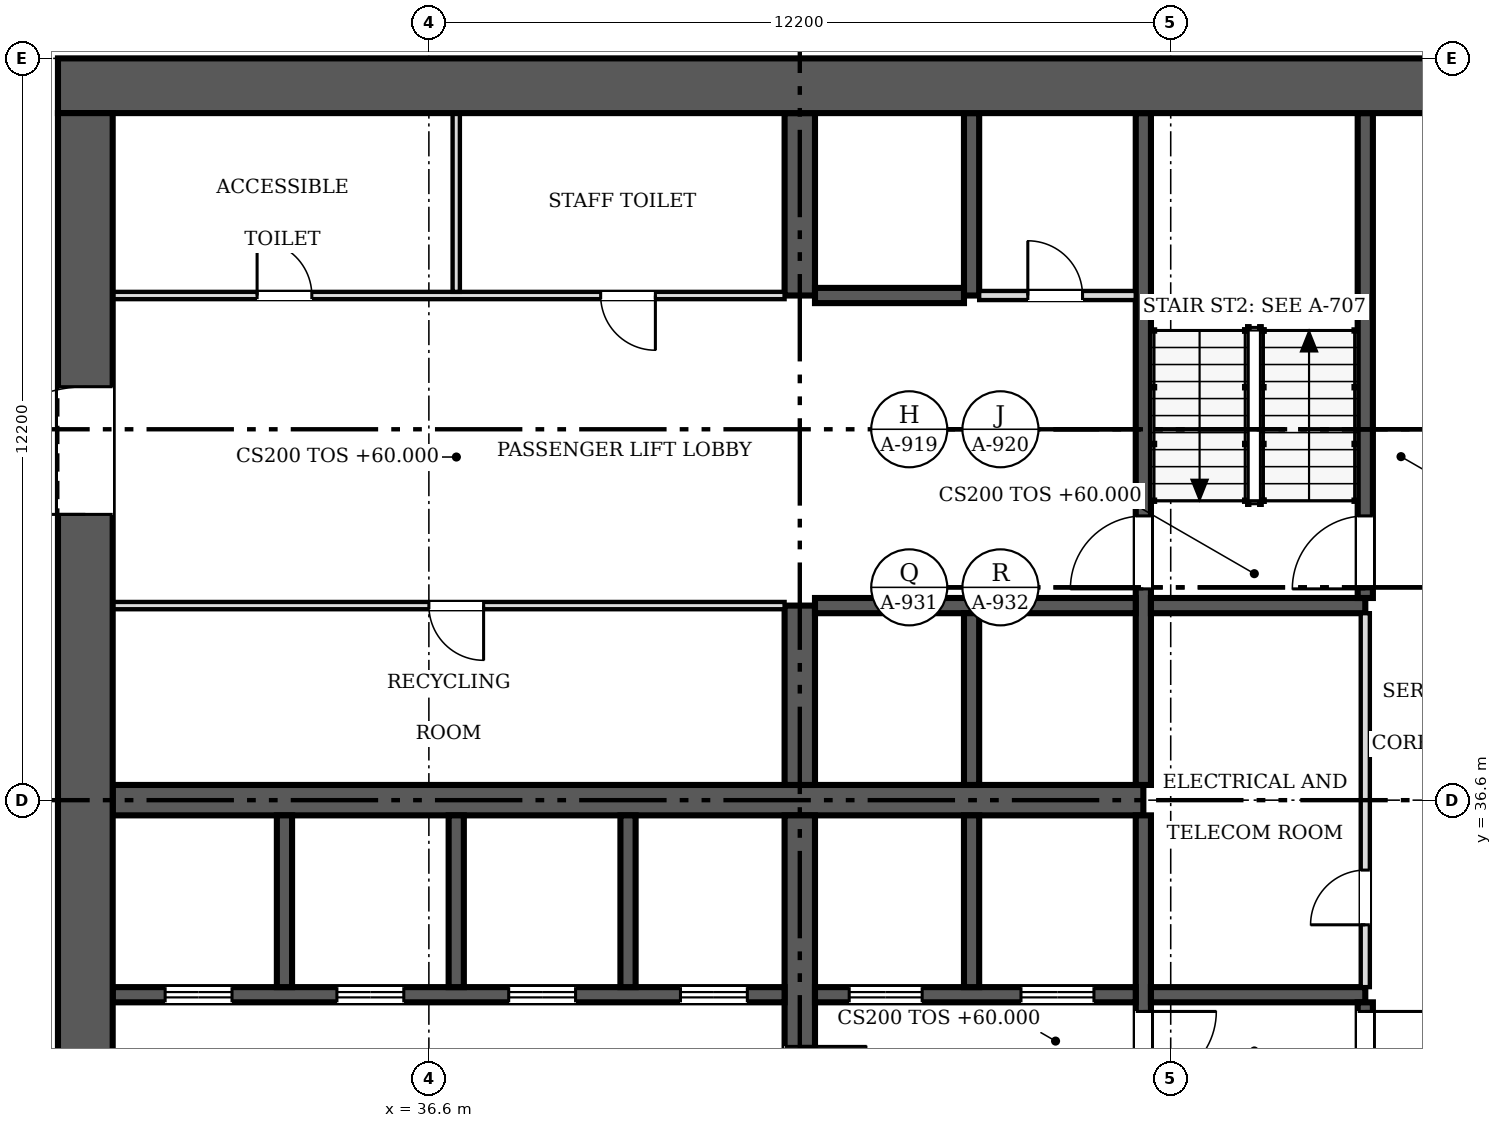
"""IFC4 building model, lengths in metres.
Left out: names, types, materials, properties, quantities, classifications, styles, units other than length and angle.
Written with IfcOpenShell. Run it as: python <this file> out.ifc"""

import sys

from ifc_helpers import new_model, si_unit, direction, frame, frame_2d, origin, place, context, subcontext, project, spatial, rectangle, extrude, source, transform, mapped, element, fill, save


model = new_model("IFC4")
c1 = context("Model", 3, precision=1e-05, world=origin(), true_north=direction((0.0, 1.0)))
c2 = subcontext(c1, "Body", "Model", "MODEL_VIEW")
j1 = project(units=[si_unit("LENGTHUNIT", "METRE"), si_unit("PLANEANGLEUNIT", "RADIAN")], contexts=[c1])
p1 = place(None, origin())
s1 = spatial("IfcSite", under=j1, at=p1, CompositionType="ELEMENT")
p2 = place(p1, origin())
s2 = spatial("IfcBuilding", under=s1, at=p2, CompositionType="ELEMENT")
p3 = place(p2, frame((0.0, 0.0, 60.0)))
s3 = spatial("IfcBuildingStorey", under=s2, at=p3, CompositionType="ELEMENT", Elevation=60.0)
p4 = place(p3, frame((30.95, 25.3, 0.0), z_axis=(0.0, 0.0, 1.0), x_axis=(0.0, 1.0, 0.0)))
e1 = element("IfcWall", 1, at=p4, inside=s3, PredefinedType="SHEAR", context=c2, shape_type="SweptSolid", body=[
    extrude(rectangle(XDim=22.6, YDim=0.9, at=frame_2d((11.3, 0.0))), origin(), (0.0, 0.0, 1.0), 3.8),
])
m1 = source(origin(), c2, "Body", "SweptSolid", [
    extrude(rectangle(XDim=2.1, YDim=2.4, at=frame_2d((1.05, 1.2))), frame((0.0, 0.46, 0.0), z_axis=(0.0, -1.0, 0.0), x_axis=(1.0, 0.0, 0.0)), (0.0, 0.0, 1.0), 0.92),
])
p5 = place(p4, frame((4.5, 0.0, 0.0)))
e2 = element("IfcOpeningElement", 2, at=p5, cuts=e1, PredefinedType="OPENING", context=c2, shape_type="MappedRepresentation", body=[
    mapped(m1, transform((0.0, 0.0, 0.0), scale=1.0)),
])
p6 = place(p4, frame((16.0, 0.0, 0.0)))
e3 = element("IfcOpeningElement", 3, at=p6, cuts=e1, PredefinedType="OPENING", context=c2, shape_type="MappedRepresentation", body=[
    mapped(m1, transform((0.0, 0.0, 0.0), scale=1.0)),
])
p7 = place(p3, frame((30.5, 48.35, 0.0), z_axis=(0.0, 0.0, 1.0), x_axis=(1.0, 0.0, 0.0)))
e4 = element("IfcWall", 4, at=p7, inside=s3, PredefinedType="SHEAR", context=c2, shape_type="SweptSolid", body=[
    extrude(rectangle(XDim=24.4, YDim=0.9, at=frame_2d((12.2, 0.0))), origin(), (0.0, 0.0, 1.0), 3.8),
])
p8 = place(p3, frame((31.4, 36.6, 0.0), z_axis=(0.0, 0.0, 1.0), x_axis=(1.0, 0.0, 0.0)))
e5 = element("IfcWall", 5, at=p8, inside=s3, PredefinedType="SHEAR", context=c2, shape_type="SweptSolid", body=[
    extrude(rectangle(XDim=16.95, YDim=0.5, at=frame_2d((8.475, 0.0))), origin(), (0.0, 0.0, 1.0), 3.8),
])
p9 = place(p3, frame((42.7, 36.35, 0.0), z_axis=(0.0, 0.0, 1.0), x_axis=(0.0, -1.0, 0.0)))
e6 = element("IfcWall", 6, at=p9, inside=s3, PredefinedType="SHEAR", context=c2, shape_type="SweptSolid", body=[
    extrude(rectangle(XDim=11.05, YDim=0.5, at=frame_2d((5.525, 0.0))), origin(), (0.0, 0.0, 1.0), 3.8),
])
m2 = source(origin(), c2, "Body", "SweptSolid", [
    extrude(rectangle(XDim=0.9, YDim=2.1, at=frame_2d((0.45, 1.05))), frame((0.0, 0.26, 0.0), z_axis=(0.0, -1.0, 0.0), x_axis=(1.0, 0.0, 0.0)), (0.0, 0.0, 1.0), 0.52),
])
p10 = place(p9, frame((6.5, 0.0, 0.0)))
e7 = element("IfcOpeningElement", 7, at=p10, cuts=e6, PredefinedType="OPENING", context=c2, shape_type="MappedRepresentation", body=[
    mapped(m2, transform((0.0, 0.0, 0.0), scale=1.0)),
])
m3 = source(origin(), c2, "Body", "SweptSolid", [
    extrude(rectangle(XDim=1.1, YDim=2.1, at=frame_2d((0.55, 1.05))), frame((0.0, 0.26, 0.0), z_axis=(0.0, -1.0, 0.0), x_axis=(1.0, 0.0, 0.0)), (0.0, 0.0, 1.0), 0.52),
])
p11 = place(p9, frame((3.8, 0.0, 0.0)))
e8 = element("IfcOpeningElement", 8, at=p11, cuts=e6, PredefinedType="OPENING", context=c2, shape_type="MappedRepresentation", body=[
    mapped(m3, transform((0.0, 0.0, 0.0), scale=1.0)),
])
p12 = place(p3, frame((42.7, 36.85, 0.0), z_axis=(0.0, 0.0, 1.0), x_axis=(0.0, 1.0, 0.0)))
e9 = element("IfcWall", 9, at=p12, inside=s3, PredefinedType="SHEAR", context=c2, shape_type="SweptSolid", body=[
    extrude(rectangle(XDim=2.95, YDim=0.5, at=frame_2d((1.475, 0.0))), origin(), (0.0, 0.0, 1.0), 3.8),
])
p13 = place(p3, frame((42.7, 44.9, 0.0), z_axis=(0.0, 0.0, 1.0), x_axis=(0.0, 1.0, 0.0)))
e10 = element("IfcWall", 10, at=p13, inside=s3, PredefinedType="SHEAR", context=c2, shape_type="SweptSolid", body=[
    extrude(rectangle(XDim=3.0, YDim=0.5, at=frame_2d((1.5, 0.0))), origin(), (0.0, 0.0, 1.0), 3.8),
])
p14 = place(p3, frame((48.35, 36.35, 0.0), z_axis=(0.0, 0.0, 1.0), x_axis=(0.0, -1.0, 0.0)))
e11 = element("IfcWall", 11, at=p14, inside=s3, PredefinedType="SOLIDWALL", context=c2, shape_type="SweptSolid", body=[
    extrude(rectangle(XDim=11.05, YDim=0.25, at=frame_2d((5.525, 0.0))), origin(), (0.0, 0.0, 1.0), 3.8),
])
m4 = source(origin(), c2, "Body", "SweptSolid", [
    extrude(rectangle(XDim=1.2, YDim=2.1, at=frame_2d((0.6, 1.05))), frame((0.0, 0.135, 0.0), z_axis=(0.0, -1.0, 0.0), x_axis=(1.0, 0.0, 0.0)), (0.0, 0.0, 1.0), 0.27),
])
p15 = place(p14, frame((3.225, 0.0, 0.0)))
e12 = element("IfcOpeningElement", 12, at=p15, cuts=e11, PredefinedType="OPENING", context=c2, shape_type="MappedRepresentation", body=[
    mapped(m4, transform((0.0, 0.0, 0.0), scale=1.0)),
])
p16 = place(p3, frame((48.35, 47.9, 0.0), z_axis=(0.0, 0.0, 1.0), x_axis=(0.0, -1.0, 0.0)))
e13 = element("IfcWall", 13, at=p16, inside=s3, PredefinedType="SOLIDWALL", context=c2, shape_type="SweptSolid", body=[
    extrude(rectangle(XDim=11.05, YDim=0.25, at=frame_2d((5.525, 0.0))), origin(), (0.0, 0.0, 1.0), 3.8),
])
p17 = place(p16, frame((6.625, 0.0, 0.0)))
e14 = element("IfcOpeningElement", 14, at=p17, cuts=e13, PredefinedType="OPENING", context=c2, shape_type="MappedRepresentation", body=[
    mapped(m4, transform((0.0, 0.0, 0.0), scale=1.0)),
])
p18 = place(p3, frame((42.45, 33.4, 0.0), z_axis=(0.0, 0.0, 1.0), x_axis=(-1.0, 0.0, 0.0)))
e15 = element("IfcWall", 15, at=p18, inside=s3, PredefinedType="SOLIDWALL", context=c2, shape_type="SweptSolid", body=[
    extrude(rectangle(XDim=11.05, YDim=0.25, at=frame_2d((5.525, 0.0))), origin(), (0.0, 0.0, 1.0), 3.8),
])
m5 = source(origin(), c2, "Body", "SweptSolid", [
    extrude(rectangle(XDim=1.1, YDim=2.1, at=frame_2d((0.55, 1.05))), frame((0.0, 0.135, 0.0), z_axis=(0.0, -1.0, 0.0), x_axis=(1.0, 0.0, 0.0)), (0.0, 0.0, 1.0), 0.27),
])
p19 = place(p18, frame((9.087, 0.0, 0.0)))
e16 = element("IfcOpeningElement", 16, at=p19, cuts=e15, PredefinedType="OPENING", context=c2, shape_type="MappedRepresentation", body=[
    mapped(m5, transform((0.0, 0.0, 0.0), scale=1.0)),
])
p20 = place(p18, frame((6.262, 0.0, 0.0)))
e17 = element("IfcOpeningElement", 17, at=p20, cuts=e15, PredefinedType="OPENING", context=c2, shape_type="MappedRepresentation", body=[
    mapped(m5, transform((0.0, 0.0, 0.0), scale=1.0)),
])
p21 = place(p18, frame((3.438, 0.0, 0.0)))
e18 = element("IfcOpeningElement", 18, at=p21, cuts=e15, PredefinedType="OPENING", context=c2, shape_type="MappedRepresentation", body=[
    mapped(m5, transform((0.0, 0.0, 0.0), scale=1.0)),
])
p22 = place(p18, frame((0.613, 0.0, 0.0)))
e19 = element("IfcOpeningElement", 19, at=p22, cuts=e15, PredefinedType="OPENING", context=c2, shape_type="MappedRepresentation", body=[
    mapped(m5, transform((0.0, 0.0, 0.0), scale=1.0)),
])
p23 = place(p3, frame((48.225, 33.4, 0.0), z_axis=(0.0, 0.0, 1.0), x_axis=(-1.0, 0.0, 0.0)))
e20 = element("IfcWall", 20, at=p23, inside=s3, PredefinedType="SOLIDWALL", context=c2, shape_type="SweptSolid", body=[
    extrude(rectangle(XDim=5.275, YDim=0.25, at=frame_2d((2.638, 0.0))), origin(), (0.0, 0.0, 1.0), 3.8),
])
p24 = place(p23, frame((3.512, 0.0, 0.0)))
e21 = element("IfcOpeningElement", 21, at=p24, cuts=e20, PredefinedType="OPENING", context=c2, shape_type="MappedRepresentation", body=[
    mapped(m4, transform((0.0, 0.0, 0.0), scale=1.0)),
])
p25 = place(p23, frame((0.688, 0.0, 0.0)))
e22 = element("IfcOpeningElement", 22, at=p25, cuts=e20, PredefinedType="OPENING", context=c2, shape_type="MappedRepresentation", body=[
    mapped(m4, transform((0.0, 0.0, 0.0), scale=1.0)),
])
p26 = place(p3, frame((48.475, 33.4, 0.0), z_axis=(0.0, 0.0, 1.0), x_axis=(1.0, 0.0, 0.0)))
e23 = element("IfcWall", 23, at=p26, inside=s3, PredefinedType="SOLIDWALL", context=c2, shape_type="SweptSolid", body=[
    extrude(rectangle(XDim=3.525, YDim=0.25, at=frame_2d((1.762, 0.0))), origin(), (0.0, 0.0, 1.0), 3.8),
])
p27 = place(p3, frame((42.95, 39.8, 0.0), z_axis=(0.0, 0.0, 1.0), x_axis=(1.0, 0.0, 0.0)))
e24 = element("IfcWall", 24, at=p27, inside=s3, PredefinedType="SOLIDWALL", context=c2, shape_type="SweptSolid", body=[
    extrude(rectangle(XDim=5.275, YDim=0.25, at=frame_2d((2.638, 0.0))), origin(), (0.0, 0.0, 1.0), 3.8),
])
p28 = place(p3, frame((48.475, 39.8, 0.0), z_axis=(0.0, 0.0, 1.0), x_axis=(1.0, 0.0, 0.0)))
e25 = element("IfcWall", 25, at=p28, inside=s3, PredefinedType="SOLIDWALL", context=c2, shape_type="SweptSolid", body=[
    extrude(rectangle(XDim=3.525, YDim=0.25, at=frame_2d((1.762, 0.0))), origin(), (0.0, 0.0, 1.0), 3.8),
])
p29 = place(p3, frame((52.0, 25.3, 0.0), z_axis=(0.0, 0.0, 1.0), x_axis=(0.0, 1.0, 0.0)))
e26 = element("IfcWall", 26, at=p29, inside=s3, PredefinedType="SOLIDWALL", context=c2, shape_type="SweptSolid", body=[
    extrude(rectangle(XDim=7.975, YDim=0.25, at=frame_2d((3.987, 0.0))), origin(), (0.0, 0.0, 1.0), 3.8),
])
p30 = place(p29, frame((6.625, 0.0, 0.0)))
e27 = element("IfcOpeningElement", 27, at=p30, cuts=e26, PredefinedType="OPENING", context=c2, shape_type="MappedRepresentation", body=[
    mapped(m4, transform((0.0, 0.0, 0.0), scale=1.0)),
])
p31 = place(p3, frame((52.0, 39.925, 0.0), z_axis=(0.0, 0.0, 1.0), x_axis=(0.0, 1.0, 0.0)))
e28 = element("IfcWall", 28, at=p31, inside=s3, PredefinedType="SOLIDWALL", context=c2, shape_type="SweptSolid", body=[
    extrude(rectangle(XDim=7.975, YDim=0.25, at=frame_2d((3.987, 0.0))), origin(), (0.0, 0.0, 1.0), 3.8),
])
p32 = place(p31, frame((0.15, 0.0, 0.0)))
e29 = element("IfcOpeningElement", 29, at=p32, cuts=e28, PredefinedType="OPENING", context=c2, shape_type="MappedRepresentation", body=[
    mapped(m4, transform((0.0, 0.0, 0.0), scale=1.0)),
])
p33 = place(p3, frame((45.525, 33.525, 0.0), z_axis=(0.0, 0.0, 1.0), x_axis=(0.0, 1.0, 0.0)))
e30 = element("IfcWall", 30, at=p33, inside=s3, PredefinedType="SOLIDWALL", context=c2, shape_type="SweptSolid", body=[
    extrude(rectangle(XDim=2.825, YDim=0.25, at=frame_2d((1.413, 0.0))), origin(), (0.0, 0.0, 1.0), 3.8),
])
p34 = place(p3, frame((45.525, 36.85, 0.0), z_axis=(0.0, 0.0, 1.0), x_axis=(0.0, 1.0, 0.0)))
e31 = element("IfcWall", 31, at=p34, inside=s3, PredefinedType="SOLIDWALL", context=c2, shape_type="SweptSolid", body=[
    extrude(rectangle(XDim=2.825, YDim=0.25, at=frame_2d((1.413, 0.0))), origin(), (0.0, 0.0, 1.0), 3.8),
])
for number, where, z_axis, x_axis in (
    (32, (34.225, 33.525, 0.0), (0.0, 0.0, 1.0), (0.0, 1.0, 0.0)),
    (33, (37.05, 33.525, 0.0), (0.0, 0.0, 1.0), (0.0, 1.0, 0.0)),
    (34, (39.875, 33.525, 0.0), (0.0, 0.0, 1.0), (0.0, 1.0, 0.0)),
):
    element("IfcWall", number, at=place(p3, frame(where, z_axis=z_axis, x_axis=x_axis)), inside=s3, PredefinedType="SOLIDWALL", context=c2, shape_type="SweptSolid", body=[
        extrude(rectangle(XDim=2.825, YDim=0.25, at=frame_2d((1.413, 0.0))), origin(), (0.0, 0.0, 1.0), 3.8),
    ])
p35 = place(p3, frame((45.525, 44.9, 0.0), z_axis=(0.0, 0.0, 1.0), x_axis=(0.0, 1.0, 0.0)))
e35 = element("IfcWall", 35, at=p35, inside=s3, PredefinedType="SOLIDWALL", context=c2, shape_type="SweptSolid", body=[
    extrude(rectangle(XDim=3.0, YDim=0.25, at=frame_2d((1.5, 0.0))), origin(), (0.0, 0.0, 1.0), 3.8),
])
p36 = place(p3, frame((42.95, 44.9, 0.0), z_axis=(0.0, 0.0, 1.0), x_axis=(1.0, 0.0, 0.0)))
e36 = element("IfcWall", 36, at=p36, inside=s3, PredefinedType="SOLIDWALL", context=c2, shape_type="SweptSolid", body=[
    extrude(rectangle(XDim=2.45, YDim=0.25, at=frame_2d((1.225, 0.0))), origin(), (0.0, 0.0, 1.0), 3.8),
])
p37 = place(p3, frame((42.45, 39.8, 0.0), z_axis=(0.0, 0.0, 1.0), x_axis=(-1.0, 0.0, 0.0)))
e37 = element("IfcWall", 37, at=p37, inside=s3, PredefinedType="PARTITIONING", context=c2, shape_type="SweptSolid", body=[
    extrude(rectangle(XDim=11.05, YDim=0.12, at=frame_2d((5.525, 0.0))), origin(), (0.0, 0.0, 1.0), 3.5),
])
m6 = source(origin(), c2, "Body", "SweptSolid", [
    extrude(rectangle(XDim=0.9, YDim=2.1, at=frame_2d((0.45, 1.05))), frame((0.0, 0.07, 0.0), z_axis=(0.0, -1.0, 0.0), x_axis=(1.0, 0.0, 0.0)), (0.0, 0.0, 1.0), 0.14),
])
p38 = place(p37, frame((4.95, 0.0, 0.0)))
e38 = element("IfcOpeningElement", 38, at=p38, cuts=e37, PredefinedType="OPENING", context=c2, shape_type="MappedRepresentation", body=[
    mapped(m6, transform((0.0, 0.0, 0.0), scale=1.0)),
])
p39 = place(p3, frame((31.4, 44.9, 0.0), z_axis=(0.0, 0.0, 1.0), x_axis=(1.0, 0.0, 0.0)))
e39 = element("IfcWall", 39, at=p39, inside=s3, PredefinedType="PARTITIONING", context=c2, shape_type="SweptSolid", body=[
    extrude(rectangle(XDim=11.05, YDim=0.12, at=frame_2d((5.525, 0.0))), origin(), (0.0, 0.0, 1.0), 3.5),
])
p40 = place(p39, frame((2.375, 0.0, 0.0)))
e40 = element("IfcOpeningElement", 40, at=p40, cuts=e39, PredefinedType="OPENING", context=c2, shape_type="MappedRepresentation", body=[
    mapped(m6, transform((0.0, 0.0, 0.0), scale=1.0)),
])
p41 = place(p39, frame((8.025, 0.0, 0.0)))
e41 = element("IfcOpeningElement", 41, at=p41, cuts=e39, PredefinedType="OPENING", context=c2, shape_type="MappedRepresentation", body=[
    mapped(m6, transform((0.0, 0.0, 0.0), scale=1.0)),
])
p42 = place(p3, frame((52.0, 33.525, 0.0), z_axis=(0.0, 0.0, 1.0), x_axis=(0.0, 1.0, 0.0)))
e42 = element("IfcWall", 42, at=p42, inside=s3, PredefinedType="PARTITIONING", context=c2, shape_type="SweptSolid", body=[
    extrude(rectangle(XDim=6.15, YDim=0.15, at=frame_2d((3.075, 0.0))), origin(), (0.0, 0.0, 1.0), 3.5),
])
m7 = source(origin(), c2, "Body", "SweptSolid", [
    extrude(rectangle(XDim=0.9, YDim=2.1, at=frame_2d((0.45, 1.05))), frame((0.0, 0.085, 0.0), z_axis=(0.0, -1.0, 0.0), x_axis=(1.0, 0.0, 0.0)), (0.0, 0.0, 1.0), 0.17),
])
p43 = place(p42, frame((1.025, 0.0, 0.0)))
e43 = element("IfcOpeningElement", 43, at=p43, cuts=e42, PredefinedType="OPENING", context=c2, shape_type="MappedRepresentation", body=[
    mapped(m7, transform((0.0, 0.0, 0.0), scale=1.0)),
])
p44 = place(p3, frame((37.05, 44.96, 0.0), z_axis=(0.0, 0.0, 1.0), x_axis=(0.0, 1.0, 0.0)))
e44 = element("IfcWall", 44, at=p44, inside=s3, PredefinedType="PARTITIONING", context=c2, shape_type="SweptSolid", body=[
    extrude(rectangle(XDim=2.94, YDim=0.12, at=frame_2d((1.47, 0.0))), origin(), (0.0, 0.0, 1.0), 3.5),
])
p45 = place(p3, frame((45.65, 44.9, 0.0), z_axis=(0.0, 0.0, 1.0), x_axis=(1.0, 0.0, 0.0)))
e45 = element("IfcWall", 45, at=p45, inside=s3, PredefinedType="PARTITIONING", context=c2, shape_type="SweptSolid", body=[
    extrude(rectangle(XDim=2.575, YDim=0.15, at=frame_2d((1.288, 0.0))), origin(), (0.0, 0.0, 1.0), 3.5),
])
p46 = place(p45, frame((0.8, 0.0, 0.0)))
e46 = element("IfcOpeningElement", 46, at=p46, cuts=e45, PredefinedType="OPENING", context=c2, shape_type="MappedRepresentation", body=[
    mapped(m7, transform((0.0, 0.0, 0.0), scale=1.0)),
])
m8 = source(origin(), c2, "Body", "SweptSolid", [
    extrude(rectangle(XDim=2.1, YDim=2.4, at=frame_2d((1.05, 1.2))), frame((0.0, 0.025, 0.0), z_axis=(0.0, -1.0, 0.0), x_axis=(1.0, 0.0, 0.0)), (0.0, 0.0, 1.0), 0.05),
])
p47 = place(p6, origin())
e47 = element("IfcDoor", 47, at=p47, inside=s3, OperationType="DOUBLE_DOOR_SINGLE_SWING", PredefinedType="DOOR", context=c2, shape_type="MappedRepresentation", body=[
    mapped(m8, transform((0.0, 0.0, 0.0), scale=1.0)),
])
fill(e3, e47)
m9 = source(origin(), c2, "Body", "SweptSolid", [
    extrude(rectangle(XDim=1.1, YDim=2.1, at=frame_2d((0.55, 1.05))), frame((0.0, 0.025, 0.0), z_axis=(0.0, -1.0, 0.0), x_axis=(1.0, 0.0, 0.0)), (0.0, 0.0, 1.0), 0.05),
])
p48 = place(p11, origin())
e48 = element("IfcDoor", 48, at=p48, inside=s3, OperationType="SINGLE_SWING_LEFT", PredefinedType="DOOR", context=c2, shape_type="MappedRepresentation", body=[
    mapped(m9, transform((0.0, 0.0, 0.0), scale=1.0)),
])
fill(e8, e48)
m10 = source(origin(), c2, "Body", "SweptSolid", [
    extrude(rectangle(XDim=1.2, YDim=2.1, at=frame_2d((0.6, 1.05))), frame((0.0, 0.025, 0.0), z_axis=(0.0, -1.0, 0.0), x_axis=(1.0, 0.0, 0.0)), (0.0, 0.0, 1.0), 0.05),
])
p49 = place(p15, origin())
e49 = element("IfcDoor", 49, at=p49, inside=s3, OperationType="SINGLE_SWING_LEFT", PredefinedType="DOOR", context=c2, shape_type="MappedRepresentation", body=[
    mapped(m10, transform((0.0, 0.0, 0.0), scale=1.0)),
])
fill(e12, e49)
p50 = place(p17, origin())
e50 = element("IfcDoor", 50, at=p50, inside=s3, OperationType="SINGLE_SWING_RIGHT", PredefinedType="DOOR", context=c2, shape_type="MappedRepresentation", body=[
    mapped(m10, transform((0.0, 0.0, 0.0), scale=1.0)),
])
fill(e14, e50)
p51 = place(p19, origin())
e51 = element("IfcDoor", 51, at=p51, inside=s3, OperationType="DOUBLE_DOOR_SLIDING", PredefinedType="DOOR", context=c2, shape_type="MappedRepresentation", body=[
    mapped(m9, transform((0.0, 0.0, 0.0), scale=1.0)),
])
fill(e16, e51)
p52 = place(p20, origin())
e52 = element("IfcDoor", 52, at=p52, inside=s3, OperationType="DOUBLE_DOOR_SLIDING", PredefinedType="DOOR", context=c2, shape_type="MappedRepresentation", body=[
    mapped(m9, transform((0.0, 0.0, 0.0), scale=1.0)),
])
fill(e17, e52)
p53 = place(p21, origin())
e53 = element("IfcDoor", 53, at=p53, inside=s3, OperationType="DOUBLE_DOOR_SLIDING", PredefinedType="DOOR", context=c2, shape_type="MappedRepresentation", body=[
    mapped(m9, transform((0.0, 0.0, 0.0), scale=1.0)),
])
fill(e18, e53)
p54 = place(p22, origin())
e54 = element("IfcDoor", 54, at=p54, inside=s3, OperationType="DOUBLE_DOOR_SLIDING", PredefinedType="DOOR", context=c2, shape_type="MappedRepresentation", body=[
    mapped(m9, transform((0.0, 0.0, 0.0), scale=1.0)),
])
fill(e19, e54)
p55 = place(p24, origin())
e55 = element("IfcDoor", 55, at=p55, inside=s3, OperationType="DOUBLE_DOOR_SLIDING", PredefinedType="DOOR", context=c2, shape_type="MappedRepresentation", body=[
    mapped(m10, transform((0.0, 0.0, 0.0), scale=1.0)),
])
fill(e21, e55)
p56 = place(p25, origin())
e56 = element("IfcDoor", 56, at=p56, inside=s3, OperationType="DOUBLE_DOOR_SLIDING", PredefinedType="DOOR", context=c2, shape_type="MappedRepresentation", body=[
    mapped(m10, transform((0.0, 0.0, 0.0), scale=1.0)),
])
fill(e22, e56)
p57 = place(p30, origin())
e57 = element("IfcDoor", 57, at=p57, inside=s3, OperationType="SINGLE_SWING_RIGHT", PredefinedType="DOOR", context=c2, shape_type="MappedRepresentation", body=[
    mapped(m10, transform((0.0, 0.0, 0.0), scale=1.0)),
])
fill(e27, e57)
p58 = place(p32, origin())
e58 = element("IfcDoor", 58, at=p58, inside=s3, OperationType="SINGLE_SWING_LEFT", PredefinedType="DOOR", context=c2, shape_type="MappedRepresentation", body=[
    mapped(m10, transform((0.0, 0.0, 0.0), scale=1.0)),
])
fill(e29, e58)
m11 = source(origin(), c2, "Body", "SweptSolid", [
    extrude(rectangle(XDim=0.9, YDim=2.1, at=frame_2d((0.45, 1.05))), frame((0.0, 0.025, 0.0), z_axis=(0.0, -1.0, 0.0), x_axis=(1.0, 0.0, 0.0)), (0.0, 0.0, 1.0), 0.05),
])
p59 = place(p38, origin())
e59 = element("IfcDoor", 59, at=p59, inside=s3, OperationType="SINGLE_SWING_LEFT", PredefinedType="DOOR", context=c2, shape_type="MappedRepresentation", body=[
    mapped(m11, transform((0.0, 0.0, 0.0), scale=1.0)),
])
fill(e38, e59)
p60 = place(p40, origin())
e60 = element("IfcDoor", 60, at=p60, inside=s3, OperationType="SINGLE_SWING_LEFT", PredefinedType="DOOR", context=c2, shape_type="MappedRepresentation", body=[
    mapped(m11, transform((0.0, 0.0, 0.0), scale=1.0)),
])
fill(e40, e60)
p61 = place(p41, origin())
e61 = element("IfcDoor", 61, at=p61, inside=s3, OperationType="SINGLE_SWING_RIGHT", PredefinedType="DOOR", context=c2, shape_type="MappedRepresentation", body=[
    mapped(m11, transform((0.0, 0.0, 0.0), scale=1.0)),
])
fill(e41, e61)
p62 = place(p43, origin())
e62 = element("IfcDoor", 62, at=p62, inside=s3, OperationType="SINGLE_SWING_LEFT", PredefinedType="DOOR", context=c2, shape_type="MappedRepresentation", body=[
    mapped(m11, transform((0.0, 0.0, 0.0), scale=1.0)),
])
fill(e43, e62)
p63 = place(p46, origin())
e63 = element("IfcDoor", 63, at=p63, inside=s3, OperationType="SINGLE_SWING_LEFT", PredefinedType="DOOR", context=c2, shape_type="MappedRepresentation", body=[
    mapped(m11, transform((0.0, 0.0, 0.0), scale=1.0)),
])
fill(e46, e63)
save(model, sys.argv[1])
